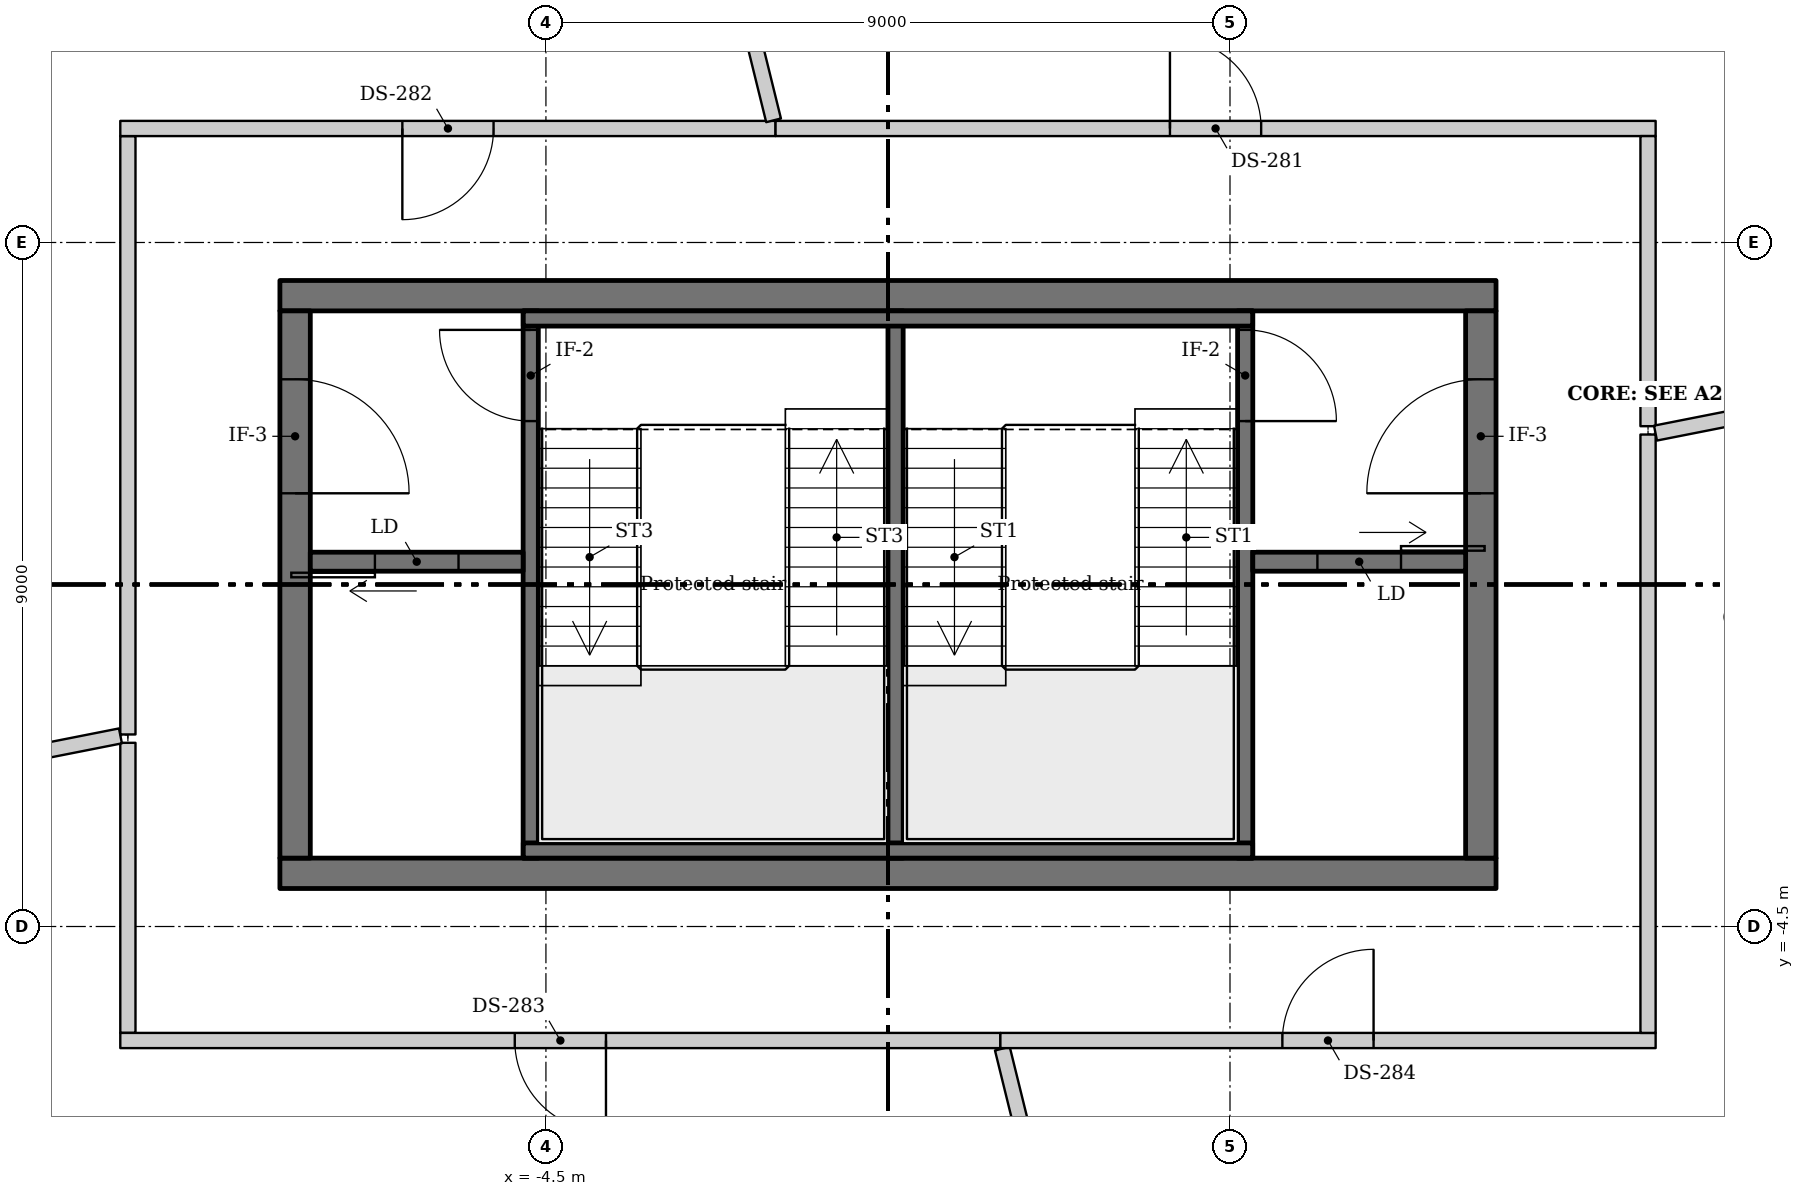
"""IFC4 building model, lengths in metres.
Left out: names, types, materials, properties, quantities, classifications, styles, units other than length and angle.
Written with IfcOpenShell. Run it as: python <this file> out.ifc"""

import sys

from ifc_helpers import new_model, si_unit, direction, frame, frame_2d, origin, place, context, subcontext, project, spatial, rectangle, extrude, source, transform, mapped, element, fill, save


model = new_model("IFC4")
c1 = context("Model", 3, precision=1e-05, world=origin(), true_north=direction((0.0, 1.0)))
c2 = subcontext(c1, "Body", "Model", "MODEL_VIEW")
j1 = project(units=[si_unit("LENGTHUNIT", "METRE"), si_unit("PLANEANGLEUNIT", "RADIAN")], contexts=[c1])
p1 = place(None, origin())
s1 = spatial("IfcSite", under=j1, at=p1, CompositionType="ELEMENT")
p2 = place(p1, origin())
s2 = spatial("IfcBuilding", under=s1, at=p2, CompositionType="ELEMENT")
p3 = place(p2, frame((0.0, 0.0, 356.5)))
s3 = spatial("IfcBuildingStorey", under=s2, at=p3, CompositionType="ELEMENT", Elevation=356.5)
m1 = source(origin(), c2, "Body", "SweptSolid", [
    extrude(rectangle(XDim=16.0, YDim=0.4, at=frame_2d((8.0, 0.0))), origin(), (0.0, 0.0, 1.0), 4.25),
])
for number, where, z_axis, x_axis in (
    (1, (-8.0, 3.8, 0.0), (0.0, 0.0, 1.0), (1.0, 0.0, 0.0)),
    (2, (-8.0, -3.8, 0.0), (0.0, 0.0, 1.0), (1.0, 0.0, 0.0)),
):
    element("IfcWall", number, at=place(p3, frame(where, z_axis=z_axis, x_axis=x_axis)), inside=s3, PredefinedType="SHEAR", context=c2, shape_type="MappedRepresentation", body=[
        mapped(m1, transform((0.0, 0.0, 0.0))),
    ])
m2 = source(origin(), c2, "Body", "SweptSolid", [
    extrude(rectangle(XDim=7.2, YDim=0.4, at=frame_2d((3.6, 0.0))), origin(), (0.0, 0.0, 1.0), 4.25),
])
p4 = place(p3, frame((7.8, -3.6, 0.0), z_axis=(0.0, 0.0, 1.0), x_axis=(0.0, 1.0, 0.0)))
e3 = element("IfcWall", 3, at=p4, inside=s3, PredefinedType="SHEAR", context=c2, shape_type="MappedRepresentation", body=[
    mapped(m2, transform((0.0, 0.0, 0.0))),
])
m3 = source(origin(), c2, "Body", "SweptSolid", [
    extrude(rectangle(XDim=1.5, YDim=2.1, at=frame_2d((0.75, 1.05))), frame((0.0, 0.21, 0.0), z_axis=(0.0, -1.0, 0.0), x_axis=(1.0, 0.0, 0.0)), (0.0, 0.0, 1.0), 0.42),
])
p5 = place(p4, frame((4.8, 0.0, 0.0)))
e4 = element("IfcOpeningElement", 4, at=p5, cuts=e3, PredefinedType="OPENING", context=c2, shape_type="MappedRepresentation", body=[
    mapped(m3, transform((0.0, 0.0, 0.0))),
])
p6 = place(p3, frame((-7.8, -3.6, 0.0), z_axis=(0.0, 0.0, 1.0), x_axis=(0.0, 1.0, 0.0)))
e5 = element("IfcWall", 5, at=p6, inside=s3, PredefinedType="SHEAR", context=c2, shape_type="MappedRepresentation", body=[
    mapped(m2, transform((0.0, 0.0, 0.0))),
])
p7 = place(p6, frame((4.8, 0.0, 0.0)))
e6 = element("IfcOpeningElement", 6, at=p7, cuts=e5, PredefinedType="OPENING", context=c2, shape_type="MappedRepresentation", body=[
    mapped(m3, transform((0.0, 0.0, 0.0))),
])
m4 = source(origin(), c2, "Body", "SweptSolid", [
    extrude(rectangle(XDim=4.033, YDim=0.2, at=frame_2d((2.017, 0.0))), origin(), (0.0, 0.0, 1.0), 4.25),
])
for number, where, z_axis, x_axis in (
    (7, (-13.744, 6.44, 0.0), (0.0, 0.0, 1.0), (0.741, 0.671, 0.0)),
    (8, (13.744, -6.44, 0.0), (0.0, 0.0, 1.0), (-0.741, -0.671, 0.0)),
):
    element("IfcWall", number, at=place(p3, frame(where, z_axis=z_axis, x_axis=x_axis)), inside=s3, PredefinedType="SOLIDWALL", context=c2, shape_type="MappedRepresentation", body=[
        mapped(m4, transform((0.0, 0.0, 0.0))),
    ])
m5 = source(origin(), c2, "Body", "SweptSolid", [
    extrude(rectangle(XDim=7.2, YDim=0.2, at=frame_2d((3.6, 0.0))), origin(), (0.0, 0.0, 1.0), 4.25),
])
p8 = place(p3, frame((0.1, 3.6, 0.0), z_axis=(0.0, 0.0, 1.0), x_axis=(0.0, -1.0, 0.0)))
e9 = element("IfcWall", 9, at=p8, inside=s3, PredefinedType="SHEAR", context=c2, shape_type="MappedRepresentation", body=[
    mapped(m5, transform((0.0, 0.0, 0.0))),
])
p9 = place(p3, frame((4.7, -3.6, 0.0), z_axis=(0.0, 0.0, 1.0), x_axis=(0.0, 1.0, 0.0)))
e10 = element("IfcWall", 10, at=p9, inside=s3, PredefinedType="SHEAR", context=c2, shape_type="MappedRepresentation", body=[
    mapped(m5, transform((0.0, 0.0, 0.0))),
])
m6 = source(origin(), c2, "Body", "SweptSolid", [
    extrude(rectangle(XDim=1.2, YDim=2.1, at=frame_2d((0.6, 1.05))), frame((0.0, 0.11, 0.0), z_axis=(0.0, -1.0, 0.0), x_axis=(1.0, 0.0, 0.0)), (0.0, 0.0, 1.0), 0.22),
])
p10 = place(p9, frame((5.75, 0.0, 0.0)))
e11 = element("IfcOpeningElement", 11, at=p10, cuts=e10, PredefinedType="OPENING", context=c2, shape_type="MappedRepresentation", body=[
    mapped(m6, transform((0.0, 0.0, 0.0))),
])
p11 = place(p3, frame((-4.7, 3.6, 0.0), z_axis=(0.0, 0.0, 1.0), x_axis=(0.0, -1.0, 0.0)))
e12 = element("IfcWall", 12, at=p11, inside=s3, PredefinedType="SHEAR", context=c2, shape_type="MappedRepresentation", body=[
    mapped(m5, transform((0.0, 0.0, 0.0))),
])
p12 = place(p11, frame((0.25, 0.0, 0.0)))
e13 = element("IfcOpeningElement", 13, at=p12, cuts=e12, PredefinedType="OPENING", context=c2, shape_type="MappedRepresentation", body=[
    mapped(m6, transform((0.0, 0.0, 0.0))),
])
m7 = source(origin(), c2, "Body", "SweptSolid", [
    extrude(rectangle(XDim=2.8, YDim=0.25, at=frame_2d((1.4, 0.0))), origin(), (0.0, 0.0, 1.0), 4.25),
])
p13 = place(p3, frame((7.6, 0.3, 0.0), z_axis=(0.0, 0.0, 1.0), x_axis=(-1.0, 0.0, 0.0)))
e14 = element("IfcWall", 14, at=p13, inside=s3, PredefinedType="SHEAR", context=c2, shape_type="MappedRepresentation", body=[
    mapped(m7, transform((0.0, 0.0, 0.0))),
])
m8 = source(origin(), c2, "Body", "SweptSolid", [
    extrude(rectangle(XDim=1.1, YDim=2.1, at=frame_2d((0.55, 1.05))), frame((0.0, 0.135, 0.0), z_axis=(0.0, -1.0, 0.0), x_axis=(1.0, 0.0, 0.0)), (0.0, 0.0, 1.0), 0.27),
])
p14 = place(p13, frame((0.85, 0.0, 0.0)))
e15 = element("IfcOpeningElement", 15, at=p14, cuts=e14, PredefinedType="OPENING", context=c2, shape_type="MappedRepresentation", body=[
    mapped(m8, transform((0.0, 0.0, 0.0))),
])
p15 = place(p3, frame((-4.8, 0.3, 0.0), z_axis=(0.0, 0.0, 1.0), x_axis=(-1.0, 0.0, 0.0)))
e16 = element("IfcWall", 16, at=p15, inside=s3, PredefinedType="SHEAR", context=c2, shape_type="MappedRepresentation", body=[
    mapped(m7, transform((0.0, 0.0, 0.0))),
])
p16 = place(p15, frame((0.85, 0.0, 0.0)))
e17 = element("IfcOpeningElement", 17, at=p16, cuts=e16, PredefinedType="OPENING", context=c2, shape_type="MappedRepresentation", body=[
    mapped(m8, transform((0.0, 0.0, 0.0))),
])
m9 = source(origin(), c2, "Body", "SweptSolid", [
    extrude(rectangle(XDim=9.596, YDim=0.2, at=frame_2d((4.798, 0.0))), origin(), (0.0, 0.0, 1.0), 4.25),
])
for number, where, z_axis, x_axis in (
    (18, (-4.798, -3.5, 0.0), (0.0, 0.0, 1.0), (1.0, 0.0, 0.0)),
    (19, (4.798, 3.5, 0.0), (0.0, 0.0, 1.0), (-1.0, 0.0, 0.0)),
):
    element("IfcWall", number, at=place(p3, frame(where, z_axis=z_axis, x_axis=x_axis)), inside=s3, PredefinedType="SHEAR", context=c2, shape_type="MappedRepresentation", body=[
        mapped(m9, transform((0.0, 0.0, 0.0))),
    ])
m10 = source(origin(), c2, "Body", "SweptSolid", [
    extrude(rectangle(XDim=3.817, YDim=0.2, at=frame_2d((1.908, 0.0))), origin(), (0.0, 0.0, 1.0), 4.25),
])
p17 = place(p3, frame((-10.0, -5.9, 0.0), z_axis=(0.0, 0.0, 1.0), x_axis=(0.0, 1.0, 0.0)))
e20 = element("IfcWall", 20, at=p17, inside=s3, PredefinedType="PARTITIONING", context=c2, shape_type="MappedRepresentation", body=[
    mapped(m10, transform((0.0, 0.0, 0.0))),
])
m11 = source(origin(), c2, "Body", "SweptSolid", [
    extrude(rectangle(XDim=5.344, YDim=0.2, at=frame_2d((2.672, 0.0))), origin(), (0.0, 0.0, 1.0), 4.25),
])
p18 = place(p3, frame((-10.098, -1.992, 0.0), z_axis=(0.0, 0.0, 1.0), x_axis=(-0.981055750952, -0.193725614011, 0.0)))
e21 = element("IfcWall", 21, at=p18, inside=s3, PredefinedType="PARTITIONING", context=c2, shape_type="MappedRepresentation", body=[
    mapped(m11, transform((0.0, 0.0, 0.0))),
])
m12 = source(origin(), c2, "Body", "SweptSolid", [
    extrude(rectangle(XDim=7.873, YDim=0.2, at=frame_2d((3.937, 0.0))), origin(), (0.0, 0.0, 1.0), 4.25),
])
p19 = place(p3, frame((-10.0, -1.973, 0.0), z_axis=(0.0, 0.0, 1.0), x_axis=(0.0, 1.0, 0.0)))
e22 = element("IfcWall", 22, at=p19, inside=s3, PredefinedType="PARTITIONING", context=c2, shape_type="MappedRepresentation", body=[
    mapped(m12, transform((0.0, 0.0, 0.0))),
])
m13 = source(origin(), c2, "Body", "SweptSolid", [
    extrude(rectangle(XDim=8.621, YDim=0.2, at=frame_2d((4.311, 0.0))), origin(), (0.0, 0.0, 1.0), 4.25),
])
p20 = place(p3, frame((-10.1, 6.0, 0.0), z_axis=(0.0, 0.0, 1.0), x_axis=(1.0, 0.0, 0.0)))
e23 = element("IfcWall", 23, at=p20, inside=s3, PredefinedType="PARTITIONING", context=c2, shape_type="MappedRepresentation", body=[
    mapped(m13, transform((0.0, 0.0, 0.0))),
])
p21 = place(p20, frame((3.711, 0.0, 0.0)))
e24 = element("IfcOpeningElement", 24, at=p21, cuts=e23, PredefinedType="OPENING", context=c2, shape_type="MappedRepresentation", body=[
    mapped(m6, transform((0.0, 0.0, 0.0))),
])
m14 = source(origin(), c2, "Body", "SweptSolid", [
    extrude(rectangle(XDim=6.014, YDim=0.2, at=frame_2d((3.007, 0.0))), origin(), (0.0, 0.0, 1.0), 4.25),
])
p22 = place(p3, frame((-1.505, 6.107, 0.0), z_axis=(0.0, 0.0, 1.0), x_axis=(-0.239468317603, 0.970904179033, 0.0)))
e25 = element("IfcWall", 25, at=p22, inside=s3, PredefinedType="PARTITIONING", context=c2, shape_type="MappedRepresentation", body=[
    mapped(m14, transform((0.0, 0.0, 0.0))),
])
m15 = source(origin(), c2, "Body", "SweptSolid", [
    extrude(rectangle(XDim=11.579, YDim=0.2, at=frame_2d((5.79, 0.0))), origin(), (0.0, 0.0, 1.0), 4.25),
])
p23 = place(p3, frame((-1.479, 6.0, 0.0), z_axis=(0.0, 0.0, 1.0), x_axis=(1.0, 0.0, 0.0)))
e26 = element("IfcWall", 26, at=p23, inside=s3, PredefinedType="PARTITIONING", context=c2, shape_type="MappedRepresentation", body=[
    mapped(m15, transform((0.0, 0.0, 0.0))),
])
p24 = place(p23, frame((5.189, 0.0, 0.0)))
e27 = element("IfcOpeningElement", 27, at=p24, cuts=e26, PredefinedType="OPENING", context=c2, shape_type="MappedRepresentation", body=[
    mapped(m6, transform((0.0, 0.0, 0.0))),
])
p25 = place(p3, frame((1.479, -6.0, 0.0), z_axis=(0.0, 0.0, 1.0), x_axis=(-1.0, 0.0, 0.0)))
e28 = element("IfcWall", 28, at=p25, inside=s3, PredefinedType="PARTITIONING", context=c2, shape_type="MappedRepresentation", body=[
    mapped(m15, transform((0.0, 0.0, 0.0))),
])
p26 = place(p25, frame((5.189, 0.0, 0.0)))
e29 = element("IfcOpeningElement", 29, at=p26, cuts=e28, PredefinedType="OPENING", context=c2, shape_type="MappedRepresentation", body=[
    mapped(m6, transform((0.0, 0.0, 0.0))),
])
p27 = place(p3, frame((1.505, -6.107, 0.0), z_axis=(0.0, 0.0, 1.0), x_axis=(0.239468317603, -0.970904179033, 0.0)))
e30 = element("IfcWall", 30, at=p27, inside=s3, PredefinedType="PARTITIONING", context=c2, shape_type="MappedRepresentation", body=[
    mapped(m14, transform((0.0, 0.0, 0.0))),
])
p28 = place(p3, frame((10.1, -6.0, 0.0), z_axis=(0.0, 0.0, 1.0), x_axis=(-1.0, 0.0, 0.0)))
e31 = element("IfcWall", 31, at=p28, inside=s3, PredefinedType="PARTITIONING", context=c2, shape_type="MappedRepresentation", body=[
    mapped(m13, transform((0.0, 0.0, 0.0))),
])
p29 = place(p28, frame((3.711, 0.0, 0.0)))
e32 = element("IfcOpeningElement", 32, at=p29, cuts=e31, PredefinedType="OPENING", context=c2, shape_type="MappedRepresentation", body=[
    mapped(m6, transform((0.0, 0.0, 0.0))),
])
p30 = place(p3, frame((10.0, 1.973, 0.0), z_axis=(0.0, 0.0, 1.0), x_axis=(0.0, -1.0, 0.0)))
e33 = element("IfcWall", 33, at=p30, inside=s3, PredefinedType="PARTITIONING", context=c2, shape_type="MappedRepresentation", body=[
    mapped(m12, transform((0.0, 0.0, 0.0))),
])
p31 = place(p3, frame((10.0, 5.9, 0.0), z_axis=(0.0, 0.0, 1.0), x_axis=(0.0, -1.0, 0.0)))
e34 = element("IfcWall", 34, at=p31, inside=s3, PredefinedType="PARTITIONING", context=c2, shape_type="MappedRepresentation", body=[
    mapped(m10, transform((0.0, 0.0, 0.0))),
])
p32 = place(p3, frame((15.34, 3.027, 0.0), z_axis=(0.0, 0.0, 1.0), x_axis=(-0.981055750952, -0.193725614011, 0.0)))
e35 = element("IfcWall", 35, at=p32, inside=s3, PredefinedType="PARTITIONING", context=c2, shape_type="MappedRepresentation", body=[
    mapped(m11, transform((0.0, 0.0, 0.0))),
])
m16 = source(origin(), c2, "Body", "SweptSolid", [
    extrude(rectangle(XDim=1.1, YDim=2.1, at=frame_2d((0.55, 1.05))), frame((0.0, 0.025, 0.0), z_axis=(0.0, -1.0, 0.0), x_axis=(1.0, 0.0, 0.0)), (0.0, 0.0, 1.0), 0.05),
])
p33 = place(p14, origin())
e36 = element("IfcDoor", 36, at=p33, inside=s3, OperationType="SLIDING_TO_LEFT", PredefinedType="DOOR", context=c2, shape_type="MappedRepresentation", body=[
    mapped(m16, transform((0.0, 0.0, 0.0))),
])
fill(e15, e36)
m17 = source(origin(), c2, "Body", "SweptSolid", [
    extrude(rectangle(XDim=1.2, YDim=2.1, at=frame_2d((0.6, 1.05))), frame((0.0, 0.025, 0.0), z_axis=(0.0, -1.0, 0.0), x_axis=(1.0, 0.0, 0.0)), (0.0, 0.0, 1.0), 0.05),
])
p34 = place(p10, origin())
e37 = element("IfcDoor", 37, at=p34, inside=s3, OperationType="SINGLE_SWING_RIGHT", PredefinedType="DOOR", context=c2, shape_type="MappedRepresentation", body=[
    mapped(m17, transform((0.0, 0.0, 0.0))),
])
fill(e11, e37)
p35 = place(p16, origin())
e38 = element("IfcDoor", 38, at=p35, inside=s3, OperationType="SLIDING_TO_RIGHT", PredefinedType="DOOR", context=c2, shape_type="MappedRepresentation", body=[
    mapped(m16, transform((0.0, 0.0, 0.0))),
])
fill(e17, e38)
p36 = place(p12, origin())
e39 = element("IfcDoor", 39, at=p36, inside=s3, OperationType="SINGLE_SWING_RIGHT", PredefinedType="DOOR", context=c2, shape_type="MappedRepresentation", body=[
    mapped(m17, transform((0.0, 0.0, 0.0))),
])
fill(e13, e39)
m18 = source(origin(), c2, "Body", "SweptSolid", [
    extrude(rectangle(XDim=1.5, YDim=2.1, at=frame_2d((0.75, 1.05))), frame((0.0, 0.025, 0.0), z_axis=(0.0, -1.0, 0.0), x_axis=(1.0, 0.0, 0.0)), (0.0, 0.0, 1.0), 0.05),
])
p37 = place(p5, origin())
e40 = element("IfcDoor", 40, at=p37, inside=s3, OperationType="DOUBLE_DOOR_SINGLE_SWING", PredefinedType="DOOR", context=c2, shape_type="MappedRepresentation", body=[
    mapped(m18, transform((0.0, 0.0, 0.0))),
])
fill(e4, e40)
p38 = place(p7, origin())
e41 = element("IfcDoor", 41, at=p38, inside=s3, OperationType="DOUBLE_DOOR_SINGLE_SWING", PredefinedType="DOOR", context=c2, shape_type="MappedRepresentation", body=[
    mapped(m18, transform((0.0, 0.0, 0.0))),
])
fill(e6, e41)
m19 = source(origin(), c2, "Body", "SweptSolid", [
    extrude(rectangle(XDim=1.2, YDim=2.1, at=frame_2d((0.6, 1.05))), frame((0.0, 0.025, 0.0), z_axis=(0.0, -1.0, 0.0), x_axis=(1.0, 0.0, 0.0)), (0.0, 0.0, 1.0), 0.05),
])
p39 = place(p24, origin())
e42 = element("IfcDoor", 42, at=p39, inside=s3, OperationType="SINGLE_SWING_LEFT", PredefinedType="DOOR", context=c2, shape_type="MappedRepresentation", body=[
    mapped(m19, transform((0.0, 0.0, 0.0))),
])
fill(e27, e42)
p40 = place(p21, origin())
e43 = element("IfcDoor", 43, at=p40, inside=s3, OperationType="SINGLE_SWING_LEFT", PredefinedType="DOOR", context=c2, shape_type="MappedRepresentation", body=[
    mapped(m19, transform((0.0, 0.0, 0.0))),
])
fill(e24, e43)
p41 = place(p26, origin())
e44 = element("IfcDoor", 44, at=p41, inside=s3, OperationType="SINGLE_SWING_LEFT", PredefinedType="DOOR", context=c2, shape_type="MappedRepresentation", body=[
    mapped(m19, transform((0.0, 0.0, 0.0))),
])
fill(e29, e44)
p42 = place(p29, origin())
e45 = element("IfcDoor", 45, at=p42, inside=s3, OperationType="SINGLE_SWING_LEFT", PredefinedType="DOOR", context=c2, shape_type="MappedRepresentation", body=[
    mapped(m19, transform((0.0, 0.0, 0.0))),
])
fill(e32, e45)
save(model, sys.argv[1])
